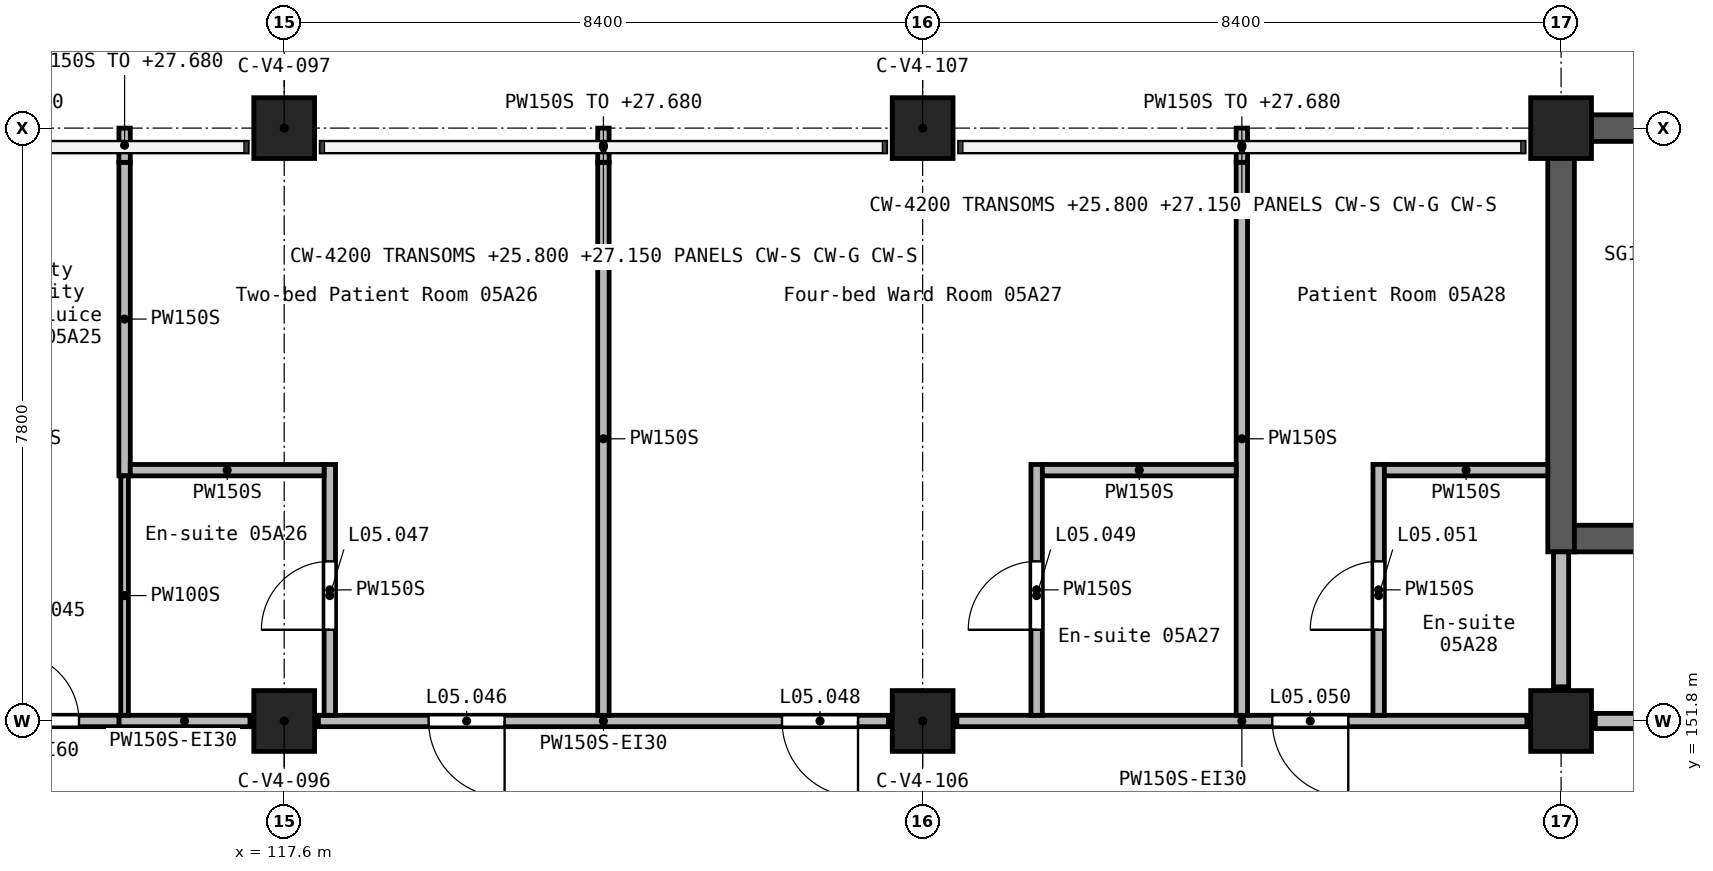
"""IFC4 building model, lengths in metres.
Left out: names, types, materials, properties, quantities, classifications, styles, units other than length and angle.
Written with IfcOpenShell. Run it as: python <this file> out.ifc"""

import sys

from ifc_helpers import new_model, si_unit, direction, frame, frame_2d, origin, origin_2d, place, context, subcontext, project, spatial, rectangle, extrude, element, fill, save


model = new_model("IFC4")
c1 = context("Model", 3, precision=1e-05, world=origin(), true_north=direction((0.0, 1.0)))
c2 = subcontext(c1, "Body", "Model", "MODEL_VIEW")
j1 = project(units=[si_unit("LENGTHUNIT", "METRE"), si_unit("PLANEANGLEUNIT", "RADIAN")], contexts=[c1])
p1 = place(None, origin())
s1 = spatial("IfcSite", under=j1, at=p1, CompositionType="ELEMENT")
p2 = place(p1, origin())
s2 = spatial("IfcBuilding", under=s1, at=p2, CompositionType="ELEMENT")
p3 = place(p2, frame((0.0, 0.0, 24.9)))
s3 = spatial("IfcBuildingStorey", under=s2, at=p3, CompositionType="ELEMENT", Elevation=24.9)
for number, where, z_axis, x_axis in (
    (1, (117.6, 151.8, 0.0), (0.0, 0.0, 1.0), (1.0, 0.0, 0.0)),
    (2, (117.6, 159.6, 0.0), (0.0, 0.0, 1.0), (1.0, 0.0, 0.0)),
    (3, (126.0, 151.8, 0.0), (0.0, 0.0, 1.0), (1.0, 0.0, 0.0)),
    (4, (126.0, 159.6, 0.0), (0.0, 0.0, 1.0), (1.0, 0.0, 0.0)),
    (5, (134.4, 151.8, 0.0), (0.0, 0.0, 1.0), (1.0, 0.0, 0.0)),
    (6, (134.4, 159.6, 0.0), (0.0, 0.0, 1.0), (1.0, 0.0, 0.0)),
):
    element("IfcColumn", number, at=place(p3, frame(where, z_axis=z_axis, x_axis=x_axis)), inside=s3, PredefinedType="COLUMN", context=c2, shape_type="SweptSolid", body=[
        extrude(rectangle(XDim=0.8, YDim=0.8, at=origin_2d()), origin(), (0.0, 0.0, 1.0), 3.9),
    ])
p4 = place(p3, frame((134.225, 159.6, 0.0), z_axis=(0.0, 0.0, 1.0), x_axis=(1.0, 0.0, 0.0)))
e7 = element("IfcWall", 7, at=p4, inside=s3, PredefinedType="SHEAR", context=c2, shape_type="SweptSolid", body=[
    extrude(rectangle(XDim=8.4, YDim=0.35, at=frame_2d((4.2, 0.0))), origin(), (0.0, 0.0, 1.0), 3.9),
])
p5 = place(p3, frame((134.4, 154.025, 0.0), z_axis=(0.0, 0.0, 1.0), x_axis=(0.0, 1.0, 0.0)))
e8 = element("IfcWall", 8, at=p5, inside=s3, PredefinedType="SHEAR", context=c2, shape_type="SweptSolid", body=[
    extrude(rectangle(XDim=5.4, YDim=0.35, at=frame_2d((2.7, 0.0))), origin(), (0.0, 0.0, 1.0), 3.9),
])
p6 = place(p3, frame((134.575, 154.2, 0.0), z_axis=(0.0, 0.0, 1.0), x_axis=(1.0, 0.0, 0.0)))
e9 = element("IfcWall", 9, at=p6, inside=s3, PredefinedType="SHEAR", context=c2, shape_type="SweptSolid", body=[
    extrude(rectangle(XDim=8.05, YDim=0.35, at=frame_2d((4.025, 0.0))), origin(), (0.0, 0.0, 1.0), 3.9),
])
p7 = place(p6, frame((6.525, 0.0, 0.0)))
e10 = element("IfcOpeningElement", 10, at=p7, cuts=e9, PredefinedType="OPENING", context=c2, shape_type="SweptSolid", body=[
    extrude(rectangle(XDim=1.1, YDim=2.1, at=frame_2d((0.55, 1.05))), frame((0.0, 0.185, 0.0), z_axis=(0.0, -1.0, 0.0), x_axis=(1.0, 0.0, 0.0)), (0.0, 0.0, 1.0), 0.37),
])
p8 = place(p3, frame((134.85, 151.8, 0.0), z_axis=(0.0, 0.0, 1.0), x_axis=(1.0, 0.0, 0.0)))
e11 = element("IfcWall", 11, at=p8, inside=s3, PredefinedType="SOLIDWALL", context=c2, shape_type="SweptSolid", body=[
    extrude(rectangle(XDim=7.5, YDim=0.2, at=frame_2d((3.75, 0.0))), origin(), (0.0, 0.0, 1.0), 3.6),
])
p9 = place(p8, frame((3.2, 0.0, 0.0)))
e12 = element("IfcOpeningElement", 12, at=p9, cuts=e11, PredefinedType="OPENING", context=c2, shape_type="SweptSolid", body=[
    extrude(rectangle(XDim=1.1, YDim=2.1, at=frame_2d((0.55, 1.05))), frame((0.0, 0.11, 0.0), z_axis=(0.0, -1.0, 0.0), x_axis=(1.0, 0.0, 0.0)), (0.0, 0.0, 1.0), 0.22),
])
p10 = place(p3, frame((134.4, 152.25, 0.0), z_axis=(0.0, 0.0, 1.0), x_axis=(0.0, 1.0, 0.0)))
e13 = element("IfcWall", 13, at=p10, inside=s3, PredefinedType="SOLIDWALL", context=c2, shape_type="SweptSolid", body=[
    extrude(rectangle(XDim=1.775, YDim=0.2, at=frame_2d((0.887, 0.0))), origin(), (0.0, 0.0, 1.0), 3.6),
])
p11 = place(p3, frame((133.95, 151.8, 0.0), z_axis=(0.0, 0.0, 1.0), x_axis=(-1.0, 0.0, 0.0)))
e14 = element("IfcWall", 14, at=p11, inside=s3, PredefinedType="PARTITIONING", context=c2, shape_type="SweptSolid", body=[
    extrude(rectangle(XDim=7.5, YDim=0.15, at=frame_2d((3.75, 0.0))), origin(), (0.0, 0.0, 1.0), 3.6),
])
p12 = place(p11, frame((2.35, 0.0, 0.0)))
e15 = element("IfcOpeningElement", 15, at=p12, cuts=e14, PredefinedType="OPENING", context=c2, shape_type="SweptSolid", body=[
    extrude(rectangle(XDim=1.0, YDim=2.1, at=frame_2d((0.5, 1.05))), frame((0.0, 0.085, 0.0), z_axis=(0.0, -1.0, 0.0), x_axis=(1.0, 0.0, 0.0)), (0.0, 0.0, 1.0), 0.17),
])
p13 = place(p3, frame((125.55, 151.8, 0.0), z_axis=(0.0, 0.0, 1.0), x_axis=(-1.0, 0.0, 0.0)))
e16 = element("IfcWall", 16, at=p13, inside=s3, PredefinedType="PARTITIONING", context=c2, shape_type="SweptSolid", body=[
    extrude(rectangle(XDim=7.5, YDim=0.15, at=frame_2d((3.75, 0.0))), origin(), (0.0, 0.0, 1.0), 3.6),
])
p14 = place(p13, frame((5.05, 0.0, 0.0)))
e17 = element("IfcOpeningElement", 17, at=p14, cuts=e16, PredefinedType="OPENING", context=c2, shape_type="SweptSolid", body=[
    extrude(rectangle(XDim=1.0, YDim=2.1, at=frame_2d((0.5, 1.05))), frame((0.0, 0.085, 0.0), z_axis=(0.0, -1.0, 0.0), x_axis=(1.0, 0.0, 0.0)), (0.0, 0.0, 1.0), 0.17),
])
p15 = place(p13, frame((0.4, 0.0, 0.0)))
e18 = element("IfcOpeningElement", 18, at=p15, cuts=e16, PredefinedType="OPENING", context=c2, shape_type="SweptSolid", body=[
    extrude(rectangle(XDim=1.0, YDim=2.1, at=frame_2d((0.5, 1.05))), frame((0.0, 0.085, 0.0), z_axis=(0.0, -1.0, 0.0), x_axis=(1.0, 0.0, 0.0)), (0.0, 0.0, 1.0), 0.17),
])
p16 = place(p3, frame((117.15, 151.8, 0.0), z_axis=(0.0, 0.0, 1.0), x_axis=(-1.0, 0.0, 0.0)))
e19 = element("IfcWall", 19, at=p16, inside=s3, PredefinedType="PARTITIONING", context=c2, shape_type="SweptSolid", body=[
    extrude(rectangle(XDim=1.725, YDim=0.15, at=frame_2d((0.862, 0.0))), origin(), (0.0, 0.0, 1.0), 3.6),
])
p17 = place(p3, frame((113.475, 151.8, 0.0), z_axis=(0.0, 0.0, 1.0), x_axis=(1.0, 0.0, 0.0)))
e20 = element("IfcWall", 20, at=p17, inside=s3, PredefinedType="PARTITIONING", context=c2, shape_type="SweptSolid", body=[
    extrude(rectangle(XDim=1.95, YDim=0.15, at=frame_2d((0.975, 0.0))), origin(), (0.0, 0.0, 1.0), 3.6),
])
p18 = place(p17, frame((0.525, 0.0, 0.0)))
e21 = element("IfcOpeningElement", 21, at=p18, cuts=e20, PredefinedType="OPENING", context=c2, shape_type="SweptSolid", body=[
    extrude(rectangle(XDim=0.9, YDim=2.1, at=frame_2d((0.45, 1.05))), frame((0.0, 0.085, 0.0), z_axis=(0.0, -1.0, 0.0), x_axis=(1.0, 0.0, 0.0)), (0.0, 0.0, 1.0), 0.17),
])
p19 = place(p3, frame((121.8, 151.875, 0.0), z_axis=(0.0, 0.0, 1.0), x_axis=(0.0, 1.0, 0.0)))
e22 = element("IfcWall", 22, at=p19, inside=s3, PredefinedType="PARTITIONING", context=c2, shape_type="SweptSolid", body=[
    extrude(rectangle(XDim=7.275, YDim=0.15, at=frame_2d((3.637, 0.0))), origin(), (0.0, 0.0, 1.0), 3.6),
])
p20 = place(p3, frame((121.8, 159.15, 0.0), z_axis=(0.0, 0.0, 1.0), x_axis=(0.0, 1.0, 0.0)))
e23 = element("IfcWall", 23, at=p20, inside=s3, PredefinedType="PARTITIONING", context=c2, shape_type="SweptSolid", body=[
    extrude(rectangle(XDim=0.45, YDim=0.15, at=frame_2d((0.225, 0.0))), origin(), (0.0, 0.0, 1.0), 2.78),
])
p21 = place(p3, frame((130.2, 151.875, 0.0), z_axis=(0.0, 0.0, 1.0), x_axis=(0.0, 1.0, 0.0)))
e24 = element("IfcWall", 24, at=p21, inside=s3, PredefinedType="PARTITIONING", context=c2, shape_type="SweptSolid", body=[
    extrude(rectangle(XDim=7.275, YDim=0.15, at=frame_2d((3.637, 0.0))), origin(), (0.0, 0.0, 1.0), 3.6),
])
p22 = place(p3, frame((130.2, 159.15, 0.0), z_axis=(0.0, 0.0, 1.0), x_axis=(0.0, 1.0, 0.0)))
e25 = element("IfcWall", 25, at=p22, inside=s3, PredefinedType="PARTITIONING", context=c2, shape_type="SweptSolid", body=[
    extrude(rectangle(XDim=0.45, YDim=0.15, at=frame_2d((0.225, 0.0))), origin(), (0.0, 0.0, 1.0), 2.78),
])
p23 = place(p3, frame((115.5, 155.025, 0.0), z_axis=(0.0, 0.0, 1.0), x_axis=(0.0, 1.0, 0.0)))
e26 = element("IfcWall", 26, at=p23, inside=s3, PredefinedType="PARTITIONING", context=c2, shape_type="SweptSolid", body=[
    extrude(rectangle(XDim=4.125, YDim=0.15, at=frame_2d((2.062, 0.0))), origin(), (0.0, 0.0, 1.0), 3.6),
])
p24 = place(p3, frame((115.5, 159.15, 0.0), z_axis=(0.0, 0.0, 1.0), x_axis=(0.0, 1.0, 0.0)))
e27 = element("IfcWall", 27, at=p24, inside=s3, PredefinedType="PARTITIONING", context=c2, shape_type="SweptSolid", body=[
    extrude(rectangle(XDim=0.45, YDim=0.15, at=frame_2d((0.225, 0.0))), origin(), (0.0, 0.0, 1.0), 2.78),
])
p25 = place(p3, frame((118.2, 151.875, 0.0), z_axis=(0.0, 0.0, 1.0), x_axis=(0.0, 1.0, 0.0)))
e28 = element("IfcWall", 28, at=p25, inside=s3, PredefinedType="PARTITIONING", context=c2, shape_type="SweptSolid", body=[
    extrude(rectangle(XDim=3.3, YDim=0.15, at=frame_2d((1.65, 0.0))), origin(), (0.0, 0.0, 1.0), 3.6),
])
p26 = place(p25, frame((1.125, 0.0, 0.0)))
e29 = element("IfcOpeningElement", 29, at=p26, cuts=e28, PredefinedType="OPENING", context=c2, shape_type="SweptSolid", body=[
    extrude(rectangle(XDim=0.9, YDim=2.1, at=frame_2d((0.45, 1.05))), frame((0.0, 0.085, 0.0), z_axis=(0.0, -1.0, 0.0), x_axis=(1.0, 0.0, 0.0)), (0.0, 0.0, 1.0), 0.17),
])
p27 = place(p3, frame((127.5, 151.875, 0.0), z_axis=(0.0, 0.0, 1.0), x_axis=(0.0, 1.0, 0.0)))
e30 = element("IfcWall", 30, at=p27, inside=s3, PredefinedType="PARTITIONING", context=c2, shape_type="SweptSolid", body=[
    extrude(rectangle(XDim=3.3, YDim=0.15, at=frame_2d((1.65, 0.0))), origin(), (0.0, 0.0, 1.0), 3.6),
])
p28 = place(p27, frame((1.125, 0.0, 0.0)))
e31 = element("IfcOpeningElement", 31, at=p28, cuts=e30, PredefinedType="OPENING", context=c2, shape_type="SweptSolid", body=[
    extrude(rectangle(XDim=0.9, YDim=2.1, at=frame_2d((0.45, 1.05))), frame((0.0, 0.085, 0.0), z_axis=(0.0, -1.0, 0.0), x_axis=(1.0, 0.0, 0.0)), (0.0, 0.0, 1.0), 0.17),
])
p29 = place(p3, frame((132.0, 151.875, 0.0), z_axis=(0.0, 0.0, 1.0), x_axis=(0.0, 1.0, 0.0)))
e32 = element("IfcWall", 32, at=p29, inside=s3, PredefinedType="PARTITIONING", context=c2, shape_type="SweptSolid", body=[
    extrude(rectangle(XDim=3.3, YDim=0.15, at=frame_2d((1.65, 0.0))), origin(), (0.0, 0.0, 1.0), 3.6),
])
p30 = place(p29, frame((1.125, 0.0, 0.0)))
e33 = element("IfcOpeningElement", 33, at=p30, cuts=e32, PredefinedType="OPENING", context=c2, shape_type="SweptSolid", body=[
    extrude(rectangle(XDim=0.9, YDim=2.1, at=frame_2d((0.45, 1.05))), frame((0.0, 0.085, 0.0), z_axis=(0.0, -1.0, 0.0), x_axis=(1.0, 0.0, 0.0)), (0.0, 0.0, 1.0), 0.17),
])
for number, where, z_axis, x_axis in (
    (34, (115.575, 155.1, 0.0), (0.0, 0.0, 1.0), (1.0, 0.0, 0.0)),
    (35, (127.575, 155.1, 0.0), (0.0, 0.0, 1.0), (1.0, 0.0, 0.0)),
):
    element("IfcWall", number, at=place(p3, frame(where, z_axis=z_axis, x_axis=x_axis)), inside=s3, PredefinedType="PARTITIONING", context=c2, shape_type="SweptSolid", body=[
        extrude(rectangle(XDim=2.55, YDim=0.15, at=frame_2d((1.275, 0.0))), origin(), (0.0, 0.0, 1.0), 3.6),
    ])
p31 = place(p3, frame((132.075, 155.1, 0.0), z_axis=(0.0, 0.0, 1.0), x_axis=(1.0, 0.0, 0.0)))
e36 = element("IfcWall", 36, at=p31, inside=s3, PredefinedType="PARTITIONING", context=c2, shape_type="SweptSolid", body=[
    extrude(rectangle(XDim=2.15, YDim=0.15, at=frame_2d((1.075, 0.0))), origin(), (0.0, 0.0, 1.0), 3.6),
])
p32 = place(p3, frame((115.5, 151.875, 0.0), z_axis=(0.0, 0.0, 1.0), x_axis=(0.0, 1.0, 0.0)))
e37 = element("IfcWall", 37, at=p32, inside=s3, PredefinedType="PARTITIONING", context=c2, shape_type="SweptSolid", body=[
    extrude(rectangle(XDim=3.15, YDim=0.1, at=frame_2d((1.575, 0.0))), origin(), (0.0, 0.0, 1.0), 3.6),
])
p33 = place(p18, origin())
e38 = element("IfcDoor", 38, at=p33, inside=s3, OperationType="SINGLE_SWING_RIGHT", PredefinedType="DOOR", context=c2, shape_type="SweptSolid", body=[
    extrude(rectangle(XDim=0.9, YDim=2.1, at=frame_2d((0.45, 1.05))), frame((0.0, 0.025, 0.0), z_axis=(0.0, -1.0, 0.0), x_axis=(1.0, 0.0, 0.0)), (0.0, 0.0, 1.0), 0.05),
])
fill(e21, e38)
p34 = place(p14, frame((1.0, 0.0, 0.0), z_axis=(0.0, 0.0, 1.0), x_axis=(-1.0, 0.0, 0.0)))
e39 = element("IfcDoor", 39, at=p34, inside=s3, OperationType="SINGLE_SWING_LEFT", PredefinedType="DOOR", context=c2, shape_type="SweptSolid", body=[
    extrude(rectangle(XDim=1.0, YDim=2.1, at=frame_2d((0.5, 1.05))), frame((0.0, 0.025, 0.0), z_axis=(0.0, -1.0, 0.0), x_axis=(1.0, 0.0, 0.0)), (0.0, 0.0, 1.0), 0.05),
])
fill(e17, e39)
p35 = place(p26, origin())
e40 = element("IfcDoor", 40, at=p35, inside=s3, OperationType="SINGLE_SWING_LEFT", PredefinedType="DOOR", context=c2, shape_type="SweptSolid", body=[
    extrude(rectangle(XDim=0.9, YDim=2.1, at=frame_2d((0.45, 1.05))), frame((0.0, 0.025, 0.0), z_axis=(0.0, -1.0, 0.0), x_axis=(1.0, 0.0, 0.0)), (0.0, 0.0, 1.0), 0.05),
])
fill(e29, e40)
p36 = place(p15, frame((1.0, 0.0, 0.0), z_axis=(0.0, 0.0, 1.0), x_axis=(-1.0, 0.0, 0.0)))
e41 = element("IfcDoor", 41, at=p36, inside=s3, OperationType="SINGLE_SWING_RIGHT", PredefinedType="DOOR", context=c2, shape_type="SweptSolid", body=[
    extrude(rectangle(XDim=1.0, YDim=2.1, at=frame_2d((0.5, 1.05))), frame((0.0, 0.025, 0.0), z_axis=(0.0, -1.0, 0.0), x_axis=(1.0, 0.0, 0.0)), (0.0, 0.0, 1.0), 0.05),
])
fill(e18, e41)
p37 = place(p28, frame((0.9, 0.0, 0.0), z_axis=(0.0, 0.0, 1.0), x_axis=(-1.0, 0.0, 0.0)))
e42 = element("IfcDoor", 42, at=p37, inside=s3, OperationType="SINGLE_SWING_RIGHT", PredefinedType="DOOR", context=c2, shape_type="SweptSolid", body=[
    extrude(rectangle(XDim=0.9, YDim=2.1, at=frame_2d((0.45, 1.05))), frame((0.0, 0.025, 0.0), z_axis=(0.0, -1.0, 0.0), x_axis=(1.0, 0.0, 0.0)), (0.0, 0.0, 1.0), 0.05),
])
fill(e31, e42)
p38 = place(p12, frame((1.0, 0.0, 0.0), z_axis=(0.0, 0.0, 1.0), x_axis=(-1.0, 0.0, 0.0)))
e43 = element("IfcDoor", 43, at=p38, inside=s3, OperationType="SINGLE_SWING_RIGHT", PredefinedType="DOOR", context=c2, shape_type="SweptSolid", body=[
    extrude(rectangle(XDim=1.0, YDim=2.1, at=frame_2d((0.5, 1.05))), frame((0.0, 0.025, 0.0), z_axis=(0.0, -1.0, 0.0), x_axis=(1.0, 0.0, 0.0)), (0.0, 0.0, 1.0), 0.05),
])
fill(e15, e43)
p39 = place(p30, frame((0.9, 0.0, 0.0), z_axis=(0.0, 0.0, 1.0), x_axis=(-1.0, 0.0, 0.0)))
e44 = element("IfcDoor", 44, at=p39, inside=s3, OperationType="SINGLE_SWING_RIGHT", PredefinedType="DOOR", context=c2, shape_type="SweptSolid", body=[
    extrude(rectangle(XDim=0.9, YDim=2.1, at=frame_2d((0.45, 1.05))), frame((0.0, 0.025, 0.0), z_axis=(0.0, -1.0, 0.0), x_axis=(1.0, 0.0, 0.0)), (0.0, 0.0, 1.0), 0.05),
])
fill(e33, e44)
save(model, sys.argv[1])
